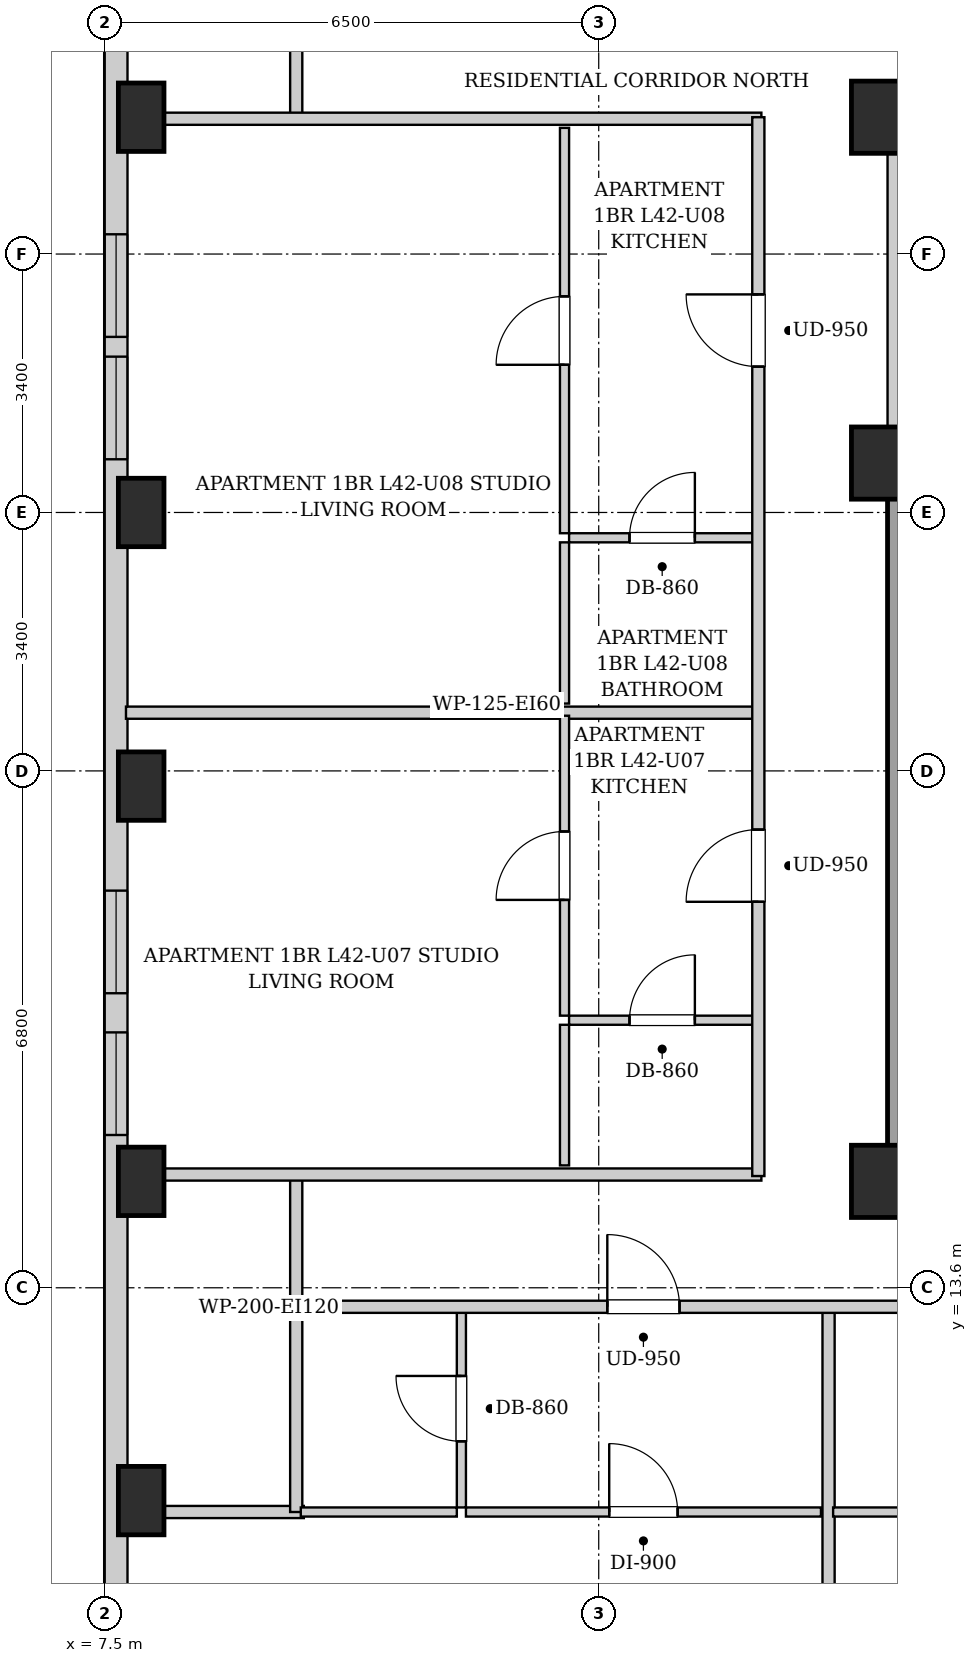
"""IFC4 building model, lengths in metres.
Left out: names, types, materials, properties, quantities, classifications, styles, units other than length and angle.
Written with IfcOpenShell. Run it as: python <this file> out.ifc"""

import sys

from ifc_helpers import new_model, si_unit, direction, frame, frame_2d, origin, origin_2d, place, context, subcontext, project, spatial, rectangle, extrude, element, fill, save


model = new_model("IFC4")
c1 = context("Model", 3, precision=1e-05, world=origin(), true_north=direction((0.0, 1.0)))
c2 = subcontext(c1, "Body", "Model", "MODEL_VIEW")
j1 = project(units=[si_unit("LENGTHUNIT", "METRE"), si_unit("PLANEANGLEUNIT", "RADIAN")], contexts=[c1])
p1 = place(None, origin())
s1 = spatial("IfcSite", under=j1, at=p1, CompositionType="ELEMENT")
p2 = place(p1, origin())
s2 = spatial("IfcBuilding", under=s1, at=p2, CompositionType="ELEMENT")
p3 = place(p2, frame((0.0, 0.0, 147.15)))
s3 = spatial("IfcBuildingStorey", under=s2, at=p3, CompositionType="ELEMENT", Elevation=147.15)
for number, where, z_axis, x_axis in (
    (1, (7.98, 10.8, 0.0), (0.0, 0.0, 1.0), (1.0, 0.0, 0.0)),
    (2, (7.98, 15.0, 0.0), (0.0, 0.0, 1.0), (1.0, 0.0, 0.0)),
    (3, (7.98, 20.2, 0.0), (0.0, 0.0, 1.0), (1.0, 0.0, 0.0)),
    (4, (7.98, 23.8, 0.0), (0.0, 0.0, 1.0), (1.0, 0.0, 0.0)),
    (5, (7.98, 29.0, 0.0), (0.0, 0.0, 1.0), (1.0, 0.0, 0.0)),
):
    element("IfcColumn", number, at=place(p3, frame(where, z_axis=z_axis, x_axis=x_axis)), inside=s3, PredefinedType="COLUMN", context=c2, shape_type="SweptSolid", body=[
        extrude(rectangle(XDim=0.6, YDim=0.9, at=origin_2d()), origin(), (0.0, 0.0, 1.0), 3.25),
    ])
for number, where, z_axis, x_axis in (
    (6, (17.8, 15.0, 0.0), (0.0, 0.0, 1.0), (1.0, 0.0, 0.0)),
    (7, (17.8, 29.0, 0.0), (0.0, 0.0, 1.0), (1.0, 0.0, 0.0)),
    (8, (17.8, 24.45, 0.0), (0.0, 0.0, 1.0), (1.0, 0.0, 0.0)),
):
    element("IfcColumn", number, at=place(p3, frame(where, z_axis=z_axis, x_axis=x_axis)), inside=s3, PredefinedType="COLUMN", context=c2, shape_type="SweptSolid", body=[
        extrude(rectangle(XDim=0.95, YDim=0.95, at=origin_2d()), origin(), (0.0, 0.0, 1.0), 3.25),
    ])
p4 = place(p3, frame((7.65, 6.3, 0.0), z_axis=(0.0, 0.0, 1.0), x_axis=(0.0, 1.0, 0.0)))
e9 = element("IfcWall", 9, at=p4, inside=s3, PredefinedType="SOLIDWALL", context=c2, shape_type="SweptSolid", body=[
    extrude(rectangle(XDim=34.5, YDim=0.3, at=frame_2d((17.25, 0.0))), origin(), (0.0, 0.0, 1.0), 2.99),
])
p5 = place(p4, frame((1.575, 0.0, 0.55)))
e10 = element("IfcOpeningElement", 10, at=p5, cuts=e9, PredefinedType="OPENING", context=c2, shape_type="SweptSolid", body=[
    extrude(rectangle(XDim=1.35, YDim=1.2, at=frame_2d((0.675, 0.6))), frame((0.0, 0.16, 0.0), z_axis=(0.0, -1.0, 0.0), x_axis=(1.0, 0.0, 0.0)), (0.0, 0.0, 1.0), 0.32),
])
p6 = place(p4, frame((30.075, 0.0, 0.55)))
e11 = element("IfcOpeningElement", 11, at=p6, cuts=e9, PredefinedType="OPENING", context=c2, shape_type="SweptSolid", body=[
    extrude(rectangle(XDim=1.35, YDim=1.2, at=frame_2d((0.675, 0.6))), frame((0.0, 0.16, 0.0), z_axis=(0.0, -1.0, 0.0), x_axis=(1.0, 0.0, 0.0)), (0.0, 0.0, 1.0), 0.32),
])
p7 = place(p4, frame((28.31, 0.0, 0.55)))
e12 = element("IfcOpeningElement", 12, at=p7, cuts=e9, PredefinedType="OPENING", context=c2, shape_type="SweptSolid", body=[
    extrude(rectangle(XDim=1.35, YDim=1.2, at=frame_2d((0.675, 0.6))), frame((0.0, 0.16, 0.0), z_axis=(0.0, -1.0, 0.0), x_axis=(1.0, 0.0, 0.0)), (0.0, 0.0, 1.0), 0.32),
])
p8 = place(p4, frame((11.175, 0.0, 0.55)))
e13 = element("IfcOpeningElement", 13, at=p8, cuts=e9, PredefinedType="OPENING", context=c2, shape_type="SweptSolid", body=[
    extrude(rectangle(XDim=1.35, YDim=1.2, at=frame_2d((0.675, 0.6))), frame((0.0, 0.16, 0.0), z_axis=(0.0, -1.0, 0.0), x_axis=(1.0, 0.0, 0.0)), (0.0, 0.0, 1.0), 0.32),
])
p9 = place(p4, frame((9.31, 0.0, 0.55)))
e14 = element("IfcOpeningElement", 14, at=p9, cuts=e9, PredefinedType="OPENING", context=c2, shape_type="SweptSolid", body=[
    extrude(rectangle(XDim=1.35, YDim=1.2, at=frame_2d((0.675, 0.6))), frame((0.0, 0.16, 0.0), z_axis=(0.0, -1.0, 0.0), x_axis=(1.0, 0.0, 0.0)), (0.0, 0.0, 1.0), 0.32),
])
p10 = place(p4, frame((18.2, 0.0, 0.55)))
e15 = element("IfcOpeningElement", 15, at=p10, cuts=e9, PredefinedType="OPENING", context=c2, shape_type="SweptSolid", body=[
    extrude(rectangle(XDim=1.35, YDim=1.2, at=frame_2d((0.675, 0.6))), frame((0.0, 0.16, 0.0), z_axis=(0.0, -1.0, 0.0), x_axis=(1.0, 0.0, 0.0)), (0.0, 0.0, 1.0), 0.32),
])
p11 = place(p4, frame((19.81, 0.0, 0.55)))
e16 = element("IfcOpeningElement", 16, at=p11, cuts=e9, PredefinedType="OPENING", context=c2, shape_type="SweptSolid", body=[
    extrude(rectangle(XDim=1.35, YDim=1.2, at=frame_2d((0.675, 0.6))), frame((0.0, 0.16, 0.0), z_axis=(0.0, -1.0, 0.0), x_axis=(1.0, 0.0, 0.0)), (0.0, 0.0, 1.0), 0.32),
])
p12 = place(p3, frame((17.95, 15.1, 0.0), z_axis=(0.0, 0.0, 1.0), x_axis=(0.0, 1.0, 0.0)))
e17 = element("IfcWall", 17, at=p12, inside=s3, PredefinedType="SHEAR", context=c2, shape_type="SweptSolid", body=[
    extrude(rectangle(XDim=9.0, YDim=0.3, at=frame_2d((4.5, 0.0))), origin(), (0.0, 0.0, 1.0), 2.99),
])
p13 = place(p3, frame((17.88, 24.12, 0.0), z_axis=(0.0, 0.0, 1.0), x_axis=(0.0, 1.0, 0.0)))
e18 = element("IfcWall", 18, at=p13, inside=s3, PredefinedType="PARTITIONING", context=c2, shape_type="SweptSolid", body=[
    extrude(rectangle(XDim=4.76, YDim=0.16, at=frame_2d((2.38, 0.0))), origin(), (0.0, 0.0, 1.0), 2.325),
])
for number, where, z_axis, x_axis in (
    (19, (10.02, 13.35, 0.0), (0.0, 0.0, 1.0), (0.0, 1.0, 0.0)),
    (20, (10.02, 28.98, 0.0), (0.0, 0.0, 1.0), (0.0, 1.0, 0.0)),
):
    element("IfcWall", number, at=place(p3, frame(where, z_axis=z_axis, x_axis=x_axis)), inside=s3, PredefinedType="PARTITIONING", context=c2, shape_type="SweptSolid", body=[
        extrude(rectangle(XDim=1.74, YDim=0.16, at=frame_2d((0.87, 0.0))), origin(), (0.0, 0.0, 1.0), 2.99),
    ])
for number, where, z_axis, x_axis in (
    (21, (7.78, 15.09, 0.0), (0.0, 0.0, 1.0), (1.0, 0.0, 0.0)),
    (22, (7.78, 28.98, 0.0), (0.0, 0.0, 1.0), (1.0, 0.0, 0.0)),
):
    element("IfcWall", number, at=place(p3, frame(where, z_axis=z_axis, x_axis=x_axis)), inside=s3, PredefinedType="PARTITIONING", context=c2, shape_type="SweptSolid", body=[
        extrude(rectangle(XDim=8.36, YDim=0.16, at=frame_2d((4.18, 0.0))), origin(), (0.0, 0.0, 1.0), 2.442),
    ])
p14 = place(p3, frame((7.78, 10.65, 0.0), z_axis=(0.0, 0.0, 1.0), x_axis=(1.0, 0.0, 0.0)))
e23 = element("IfcWall", 23, at=p14, inside=s3, PredefinedType="PARTITIONING", context=c2, shape_type="SweptSolid", body=[
    extrude(rectangle(XDim=2.34, YDim=0.16, at=frame_2d((1.17, 0.0))), origin(), (0.0, 0.0, 1.0), 2.99),
])
p15 = place(p3, frame((10.02, 10.65, 0.0), z_axis=(0.0, 0.0, 1.0), x_axis=(0.0, 1.0, 0.0)))
e24 = element("IfcWall", 24, at=p15, inside=s3, PredefinedType="PARTITIONING", context=c2, shape_type="SweptSolid", body=[
    extrude(rectangle(XDim=2.66, YDim=0.16, at=frame_2d((1.33, 0.0))), origin(), (0.0, 0.0, 1.0), 2.99),
])
p16 = place(p3, frame((12.193, 10.71, 0.0), z_axis=(0.0, 0.0, 1.0), x_axis=(0.0, 1.0, 0.0)))
e25 = element("IfcWall", 25, at=p16, inside=s3, PredefinedType="PARTITIONING", context=c2, shape_type="SweptSolid", body=[
    extrude(rectangle(XDim=2.6, YDim=0.12, at=frame_2d((1.3, 0.0))), origin(), (0.0, 0.0, 1.0), 2.99),
])
p17 = place(p16, frame((0.87, 0.0, 0.0)))
e26 = element("IfcOpeningElement", 26, at=p17, cuts=e25, PredefinedType="OPENING", context=c2, shape_type="SweptSolid", body=[
    extrude(rectangle(XDim=0.86, YDim=2.05, at=frame_2d((0.43, 1.025))), frame((0.0, 0.07, 0.0), z_axis=(0.0, -1.0, 0.0), x_axis=(1.0, 0.0, 0.0)), (0.0, 0.0, 1.0), 0.14),
])
p18 = place(p3, frame((10.08, 10.65, 0.0), z_axis=(0.0, 0.0, 1.0), x_axis=(1.0, 0.0, 0.0)))
e27 = element("IfcWall", 27, at=p18, inside=s3, PredefinedType="PARTITIONING", context=c2, shape_type="SweptSolid", body=[
    extrude(rectangle(XDim=2.053, YDim=0.12, at=frame_2d((1.026, 0.0))), origin(), (0.0, 0.0, 1.0), 2.99),
])
p19 = place(p3, frame((12.253, 10.65, 0.0), z_axis=(0.0, 0.0, 1.0), x_axis=(1.0, 0.0, 0.0)))
e28 = element("IfcWall", 28, at=p19, inside=s3, PredefinedType="PARTITIONING", context=c2, shape_type="SweptSolid", body=[
    extrude(rectangle(XDim=4.671, YDim=0.12, at=frame_2d((2.335, 0.0))), origin(), (0.0, 0.0, 1.0), 2.99),
])
p20 = place(p19, frame((1.885, 0.0, 0.0)))
e29 = element("IfcOpeningElement", 29, at=p20, cuts=e28, PredefinedType="OPENING", context=c2, shape_type="SweptSolid", body=[
    extrude(rectangle(XDim=0.9, YDim=2.05, at=frame_2d((0.45, 1.025))), frame((0.0, 0.07, 0.0), z_axis=(0.0, -1.0, 0.0), x_axis=(1.0, 0.0, 0.0)), (0.0, 0.0, 1.0), 0.14),
])
p21 = place(p3, frame((17.024, 6.06, 0.0), z_axis=(0.0, 0.0, 1.0), x_axis=(0.0, 1.0, 0.0)))
e30 = element("IfcWall", 30, at=p21, inside=s3, PredefinedType="PARTITIONING", context=c2, shape_type="SweptSolid", body=[
    extrude(rectangle(XDim=7.25, YDim=0.16, at=frame_2d((3.625, 0.0))), origin(), (0.0, 0.0, 1.0), 2.99),
])
p22 = place(p3, frame((17.084, 10.65, 0.0), z_axis=(0.0, 0.0, 1.0), x_axis=(1.0, 0.0, 0.0)))
e31 = element("IfcWall", 31, at=p22, inside=s3, PredefinedType="PARTITIONING", context=c2, shape_type="SweptSolid", body=[
    extrude(rectangle(XDim=2.4, YDim=0.12, at=frame_2d((1.2, 0.0))), origin(), (0.0, 0.0, 1.0), 2.99),
])
p23 = place(p3, frame((7.78, 21.166, 0.0), z_axis=(0.0, 0.0, 1.0), x_axis=(1.0, 0.0, 0.0)))
e32 = element("IfcWall", 32, at=p23, inside=s3, PredefinedType="PARTITIONING", context=c2, shape_type="SweptSolid", body=[
    extrude(rectangle(XDim=8.28, YDim=0.16, at=frame_2d((4.14, 0.0))), origin(), (0.0, 0.0, 1.0), 2.99),
])
p24 = place(p3, frame((13.61, 17.12, 0.0), z_axis=(0.0, 0.0, 1.0), x_axis=(1.0, 0.0, 0.0)))
e33 = element("IfcWall", 33, at=p24, inside=s3, PredefinedType="PARTITIONING", context=c2, shape_type="SweptSolid", body=[
    extrude(rectangle(XDim=2.45, YDim=0.12, at=frame_2d((1.225, 0.0))), origin(), (0.0, 0.0, 1.0), 2.99),
])
p25 = place(p24, frame((0.795, 0.0, 0.0)))
e34 = element("IfcOpeningElement", 34, at=p25, cuts=e33, PredefinedType="OPENING", context=c2, shape_type="SweptSolid", body=[
    extrude(rectangle(XDim=0.86, YDim=2.05, at=frame_2d((0.43, 1.025))), frame((0.0, 0.07, 0.0), z_axis=(0.0, -1.0, 0.0), x_axis=(1.0, 0.0, 0.0)), (0.0, 0.0, 1.0), 0.14),
])
p26 = place(p3, frame((13.55, 15.21, 0.0), z_axis=(0.0, 0.0, 1.0), x_axis=(0.0, 1.0, 0.0)))
e35 = element("IfcWall", 35, at=p26, inside=s3, PredefinedType="PARTITIONING", context=c2, shape_type="SweptSolid", body=[
    extrude(rectangle(XDim=1.85, YDim=0.12, at=frame_2d((0.925, 0.0))), origin(), (0.0, 0.0, 1.0), 2.99),
])
p27 = place(p3, frame((13.55, 17.18, 0.0), z_axis=(0.0, 0.0, 1.0), x_axis=(0.0, 1.0, 0.0)))
e36 = element("IfcWall", 36, at=p27, inside=s3, PredefinedType="PARTITIONING", context=c2, shape_type="SweptSolid", body=[
    extrude(rectangle(XDim=3.946, YDim=0.12, at=frame_2d((1.973, 0.0))), origin(), (0.0, 0.0, 1.0), 2.99),
])
p28 = place(p27, frame((1.523, 0.0, 0.0)))
e37 = element("IfcOpeningElement", 37, at=p28, cuts=e36, PredefinedType="OPENING", context=c2, shape_type="SweptSolid", body=[
    extrude(rectangle(XDim=0.9, YDim=2.05, at=frame_2d((0.45, 1.025))), frame((0.0, 0.07, 0.0), z_axis=(0.0, -1.0, 0.0), x_axis=(1.0, 0.0, 0.0)), (0.0, 0.0, 1.0), 0.14),
])
p29 = place(p3, frame((13.61, 23.467, 0.0), z_axis=(0.0, 0.0, 1.0), x_axis=(1.0, 0.0, 0.0)))
e38 = element("IfcWall", 38, at=p29, inside=s3, PredefinedType="PARTITIONING", context=c2, shape_type="SweptSolid", body=[
    extrude(rectangle(XDim=2.45, YDim=0.12, at=frame_2d((1.225, 0.0))), origin(), (0.0, 0.0, 1.0), 2.99),
])
p30 = place(p29, frame((0.795, 0.0, 0.0)))
e39 = element("IfcOpeningElement", 39, at=p30, cuts=e38, PredefinedType="OPENING", context=c2, shape_type="SweptSolid", body=[
    extrude(rectangle(XDim=0.86, YDim=2.05, at=frame_2d((0.43, 1.025))), frame((0.0, 0.07, 0.0), z_axis=(0.0, -1.0, 0.0), x_axis=(1.0, 0.0, 0.0)), (0.0, 0.0, 1.0), 0.14),
])
p31 = place(p3, frame((13.55, 21.286, 0.0), z_axis=(0.0, 0.0, 1.0), x_axis=(0.0, 1.0, 0.0)))
e40 = element("IfcWall", 40, at=p31, inside=s3, PredefinedType="PARTITIONING", context=c2, shape_type="SweptSolid", body=[
    extrude(rectangle(XDim=2.121, YDim=0.12, at=frame_2d((1.061, 0.0))), origin(), (0.0, 0.0, 1.0), 2.99),
])
p32 = place(p3, frame((13.55, 23.527, 0.0), z_axis=(0.0, 0.0, 1.0), x_axis=(0.0, 1.0, 0.0)))
e41 = element("IfcWall", 41, at=p32, inside=s3, PredefinedType="PARTITIONING", context=c2, shape_type="SweptSolid", body=[
    extrude(rectangle(XDim=5.333, YDim=0.12, at=frame_2d((2.667, 0.0))), origin(), (0.0, 0.0, 1.0), 2.99),
])
p33 = place(p32, frame((2.216, 0.0, 0.0)))
e42 = element("IfcOpeningElement", 42, at=p33, cuts=e41, PredefinedType="OPENING", context=c2, shape_type="SweptSolid", body=[
    extrude(rectangle(XDim=0.9, YDim=2.05, at=frame_2d((0.45, 1.025))), frame((0.0, 0.07, 0.0), z_axis=(0.0, -1.0, 0.0), x_axis=(1.0, 0.0, 0.0)), (0.0, 0.0, 1.0), 0.14),
])
p34 = place(p3, frame((10.05, 13.35, 0.0), z_axis=(0.0, 0.0, 1.0), x_axis=(1.0, 0.0, 0.0)))
e43 = element("IfcWall", 43, at=p34, inside=s3, PredefinedType="PARTITIONING", context=c2, shape_type="SweptSolid", body=[
    extrude(rectangle(XDim=27.7, YDim=0.16, at=frame_2d((13.85, 0.0))), origin(), (0.0, 0.0, 1.0), 2.99),
])
p35 = place(p34, frame((4.063, 0.0, 0.0)))
e44 = element("IfcOpeningElement", 44, at=p35, cuts=e43, PredefinedType="OPENING", context=c2, shape_type="SweptSolid", body=[
    extrude(rectangle(XDim=0.95, YDim=2.1, at=frame_2d((0.475, 1.05))), frame((0.0, 0.09, 0.0), z_axis=(0.0, -1.0, 0.0), x_axis=(1.0, 0.0, 0.0)), (0.0, 0.0, 1.0), 0.18),
])
p36 = place(p34, frame((11.735, 0.0, 0.0)))
e45 = element("IfcOpeningElement", 45, at=p36, cuts=e43, PredefinedType="OPENING", context=c2, shape_type="SweptSolid", body=[
    extrude(rectangle(XDim=0.95, YDim=2.1, at=frame_2d((0.475, 1.05))), frame((0.0, 0.09, 0.0), z_axis=(0.0, -1.0, 0.0), x_axis=(1.0, 0.0, 0.0)), (0.0, 0.0, 1.0), 0.18),
])
p37 = place(p3, frame((16.1, 15.07, 0.0), z_axis=(0.0, 0.0, 1.0), x_axis=(0.0, 1.0, 0.0)))
e46 = element("IfcWall", 46, at=p37, inside=s3, PredefinedType="PARTITIONING", context=c2, shape_type="SweptSolid", body=[
    extrude(rectangle(XDim=13.93, YDim=0.16, at=frame_2d((6.965, 0.0))), origin(), (0.0, 0.0, 1.0), 2.99),
])
p38 = place(p37, frame((3.608, 0.0, 0.0)))
e47 = element("IfcOpeningElement", 47, at=p38, cuts=e46, PredefinedType="OPENING", context=c2, shape_type="SweptSolid", body=[
    extrude(rectangle(XDim=0.95, YDim=2.1, at=frame_2d((0.475, 1.05))), frame((0.0, 0.09, 0.0), z_axis=(0.0, -1.0, 0.0), x_axis=(1.0, 0.0, 0.0)), (0.0, 0.0, 1.0), 0.18),
])
p39 = place(p37, frame((10.649, 0.0, 0.0)))
e48 = element("IfcOpeningElement", 48, at=p39, cuts=e46, PredefinedType="OPENING", context=c2, shape_type="SweptSolid", body=[
    extrude(rectangle(XDim=0.95, YDim=2.1, at=frame_2d((0.475, 1.05))), frame((0.0, 0.09, 0.0), z_axis=(0.0, -1.0, 0.0), x_axis=(1.0, 0.0, 0.0)), (0.0, 0.0, 1.0), 0.18),
])
p40 = place(p17, origin())
e49 = element("IfcDoor", 49, at=p40, inside=s3, OperationType="SINGLE_SWING_RIGHT", PredefinedType="DOOR", context=c2, shape_type="SweptSolid", body=[
    extrude(rectangle(XDim=0.86, YDim=2.05, at=frame_2d((0.43, 1.025))), frame((0.0, 0.025, 0.0), z_axis=(0.0, -1.0, 0.0), x_axis=(1.0, 0.0, 0.0)), (0.0, 0.0, 1.0), 0.05),
])
fill(e26, e49)
p41 = place(p20, origin())
e50 = element("IfcDoor", 50, at=p41, inside=s3, OperationType="SINGLE_SWING_LEFT", PredefinedType="DOOR", context=c2, shape_type="SweptSolid", body=[
    extrude(rectangle(XDim=0.9, YDim=2.05, at=frame_2d((0.45, 1.025))), frame((0.0, 0.025, 0.0), z_axis=(0.0, -1.0, 0.0), x_axis=(1.0, 0.0, 0.0)), (0.0, 0.0, 1.0), 0.05),
])
fill(e29, e50)
p42 = place(p25, origin())
e51 = element("IfcDoor", 51, at=p42, inside=s3, OperationType="SINGLE_SWING_RIGHT", PredefinedType="DOOR", context=c2, shape_type="SweptSolid", body=[
    extrude(rectangle(XDim=0.86, YDim=2.05, at=frame_2d((0.43, 1.025))), frame((0.0, 0.025, 0.0), z_axis=(0.0, -1.0, 0.0), x_axis=(1.0, 0.0, 0.0)), (0.0, 0.0, 1.0), 0.05),
])
fill(e34, e51)
p43 = place(p28, origin())
e52 = element("IfcDoor", 52, at=p43, inside=s3, OperationType="SINGLE_SWING_LEFT", PredefinedType="DOOR", context=c2, shape_type="SweptSolid", body=[
    extrude(rectangle(XDim=0.9, YDim=2.05, at=frame_2d((0.45, 1.025))), frame((0.0, 0.025, 0.0), z_axis=(0.0, -1.0, 0.0), x_axis=(1.0, 0.0, 0.0)), (0.0, 0.0, 1.0), 0.05),
])
fill(e37, e52)
p44 = place(p30, origin())
e53 = element("IfcDoor", 53, at=p44, inside=s3, OperationType="SINGLE_SWING_RIGHT", PredefinedType="DOOR", context=c2, shape_type="SweptSolid", body=[
    extrude(rectangle(XDim=0.86, YDim=2.05, at=frame_2d((0.43, 1.025))), frame((0.0, 0.025, 0.0), z_axis=(0.0, -1.0, 0.0), x_axis=(1.0, 0.0, 0.0)), (0.0, 0.0, 1.0), 0.05),
])
fill(e39, e53)
p45 = place(p33, origin())
e54 = element("IfcDoor", 54, at=p45, inside=s3, OperationType="SINGLE_SWING_LEFT", PredefinedType="DOOR", context=c2, shape_type="SweptSolid", body=[
    extrude(rectangle(XDim=0.9, YDim=2.05, at=frame_2d((0.45, 1.025))), frame((0.0, 0.025, 0.0), z_axis=(0.0, -1.0, 0.0), x_axis=(1.0, 0.0, 0.0)), (0.0, 0.0, 1.0), 0.05),
])
fill(e42, e54)
p46 = place(p35, origin())
e55 = element("IfcDoor", 55, at=p46, inside=s3, OperationType="SINGLE_SWING_LEFT", PredefinedType="DOOR", context=c2, shape_type="SweptSolid", body=[
    extrude(rectangle(XDim=0.95, YDim=2.1, at=frame_2d((0.475, 1.05))), frame((0.0, 0.025, 0.0), z_axis=(0.0, -1.0, 0.0), x_axis=(1.0, 0.0, 0.0)), (0.0, 0.0, 1.0), 0.05),
])
fill(e44, e55)
p47 = place(p38, origin())
e56 = element("IfcDoor", 56, at=p47, inside=s3, OperationType="SINGLE_SWING_LEFT", PredefinedType="DOOR", context=c2, shape_type="SweptSolid", body=[
    extrude(rectangle(XDim=0.95, YDim=2.1, at=frame_2d((0.475, 1.05))), frame((0.0, 0.025, 0.0), z_axis=(0.0, -1.0, 0.0), x_axis=(1.0, 0.0, 0.0)), (0.0, 0.0, 1.0), 0.05),
])
fill(e47, e56)
p48 = place(p39, origin())
e57 = element("IfcDoor", 57, at=p48, inside=s3, OperationType="SINGLE_SWING_RIGHT", PredefinedType="DOOR", context=c2, shape_type="SweptSolid", body=[
    extrude(rectangle(XDim=0.95, YDim=2.1, at=frame_2d((0.475, 1.05))), frame((0.0, 0.025, 0.0), z_axis=(0.0, -1.0, 0.0), x_axis=(1.0, 0.0, 0.0)), (0.0, 0.0, 1.0), 0.05),
])
fill(e48, e57)
p49 = place(p8, origin())
e58 = element("IfcWindow", 58, at=p49, inside=s3, PartitioningType="SINGLE_PANEL", PredefinedType="WINDOW", context=c2, shape_type="SweptSolid", body=[
    extrude(rectangle(XDim=1.35, YDim=1.2, at=frame_2d((0.675, 0.6))), frame((0.0, 0.03, 0.0), z_axis=(0.0, -1.0, 0.0), x_axis=(1.0, 0.0, 0.0)), (0.0, 0.0, 1.0), 0.06),
])
fill(e13, e58)
p50 = place(p9, origin())
e59 = element("IfcWindow", 59, at=p50, inside=s3, PartitioningType="SINGLE_PANEL", PredefinedType="WINDOW", context=c2, shape_type="SweptSolid", body=[
    extrude(rectangle(XDim=1.35, YDim=1.2, at=frame_2d((0.675, 0.6))), frame((0.0, 0.03, 0.0), z_axis=(0.0, -1.0, 0.0), x_axis=(1.0, 0.0, 0.0)), (0.0, 0.0, 1.0), 0.06),
])
fill(e14, e59)
p51 = place(p10, origin())
e60 = element("IfcWindow", 60, at=p51, inside=s3, PartitioningType="SINGLE_PANEL", PredefinedType="WINDOW", context=c2, shape_type="SweptSolid", body=[
    extrude(rectangle(XDim=1.35, YDim=1.2, at=frame_2d((0.675, 0.6))), frame((0.0, 0.03, 0.0), z_axis=(0.0, -1.0, 0.0), x_axis=(1.0, 0.0, 0.0)), (0.0, 0.0, 1.0), 0.06),
])
fill(e15, e60)
p52 = place(p11, origin())
e61 = element("IfcWindow", 61, at=p52, inside=s3, PartitioningType="SINGLE_PANEL", PredefinedType="WINDOW", context=c2, shape_type="SweptSolid", body=[
    extrude(rectangle(XDim=1.35, YDim=1.2, at=frame_2d((0.675, 0.6))), frame((0.0, 0.03, 0.0), z_axis=(0.0, -1.0, 0.0), x_axis=(1.0, 0.0, 0.0)), (0.0, 0.0, 1.0), 0.06),
])
fill(e16, e61)
save(model, sys.argv[1])
